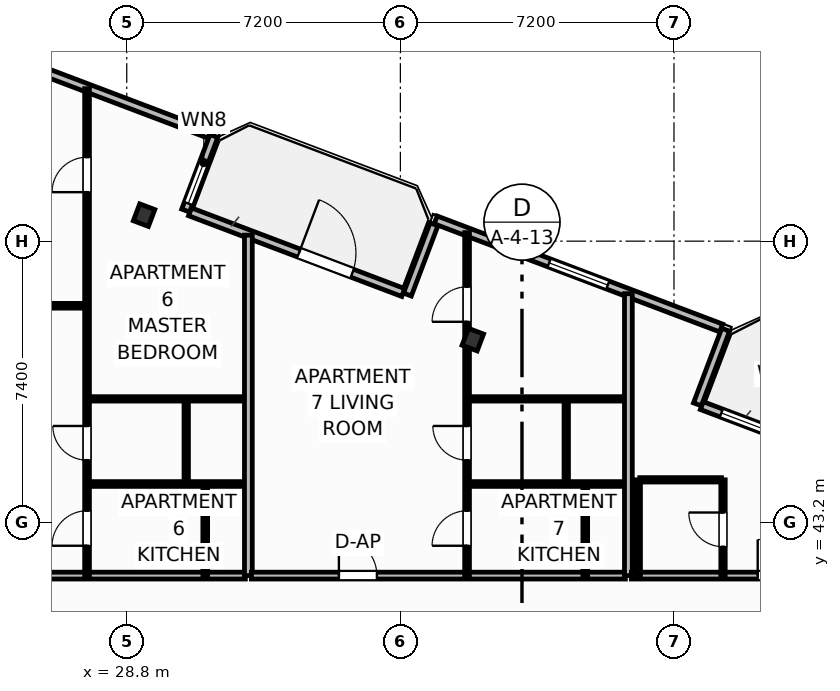
"""IFC4 building model, lengths in metres.
Left out: names, types, materials, properties, quantities, classifications, styles, units other than length and angle.
Written with IfcOpenShell. Run it as: python <this file> out.ifc"""

import sys

from ifc_helpers import new_model, si_unit, direction, frame, frame_2d, origin, origin_2d, place, context, subcontext, project, spatial, rectangle, i_section, extrude, element, fill, save


model = new_model("IFC4")
c1 = context("Model", 3, precision=1e-05, world=origin(), true_north=direction((0.0, 1.0)))
c2 = subcontext(c1, "Body", "Model", "MODEL_VIEW")
j1 = project(units=[si_unit("LENGTHUNIT", "METRE"), si_unit("PLANEANGLEUNIT", "RADIAN")], contexts=[c1])
p1 = place(None, origin())
s1 = spatial("IfcSite", under=j1, at=p1, CompositionType="ELEMENT")
p2 = place(p1, origin())
s2 = spatial("IfcBuilding", under=s1, at=p2, CompositionType="ELEMENT")
p3 = place(p2, frame((0.0, 0.0, 102.1)))
s3 = spatial("IfcBuildingStorey", under=s2, at=p3, CompositionType="ELEMENT", Elevation=102.1)
for number, where, z_axis, x_axis in (
    (1, (37.906, 48.009, 0.0), (0.0, 0.0, 1.0), (0.935, -0.354, 0.0)),
    (2, (29.256, 51.284, 0.0), (0.0, 0.0, 1.0), (0.935, -0.354, 0.0)),
):
    element("IfcColumn", number, at=place(p3, frame(where, z_axis=z_axis, x_axis=x_axis)), inside=s3, PredefinedType="COLUMN", context=c2, shape_type="SweptSolid", body=[
        extrude(i_section(OverallWidth=0.424, OverallDepth=0.474, WebThickness=0.048, FlangeThickness=0.077, FilletRadius=0.025, at=origin_2d()), origin(), (0.0, 0.0, 1.0), 3.7),
    ])
p4 = place(p3, frame((30.465, 51.372, 0.0), z_axis=(0.0, 0.0, 1.0), x_axis=(0.935227640088, -0.354046976001, 0.0)))
e3 = element("IfcWall", 3, at=p4, inside=s3, PredefinedType="SOLIDWALL", context=c2, shape_type="SweptSolid", body=[
    extrude(rectangle(XDim=6.0, YDim=0.22, at=frame_2d((3.0, 0.0))), origin(), (0.0, 0.0, 1.0), 2.73),
])
p5 = place(p4, frame((3.064, 0.0, 0.0)))
e4 = element("IfcOpeningElement", 4, at=p5, cuts=e3, PredefinedType="OPENING", context=c2, shape_type="SweptSolid", body=[
    extrude(rectangle(XDim=1.5, YDim=2.25, at=frame_2d((0.75, 1.125))), frame((0.0, 0.12, 0.0), z_axis=(0.0, -1.0, 0.0), x_axis=(1.0, 0.0, 0.0)), (0.0, 0.0, 1.0), 0.24),
])
p6 = place(p3, frame((43.932, 46.273, 0.0), z_axis=(0.0, 0.0, 1.0), x_axis=(0.93521416643, -0.354082565101, 0.0)))
e5 = element("IfcWall", 5, at=p6, inside=s3, PredefinedType="SOLIDWALL", context=c2, shape_type="SweptSolid", body=[
    extrude(rectangle(XDim=6.0, YDim=0.22, at=frame_2d((3.0, 0.0))), origin(), (0.0, 0.0, 1.0), 2.73),
])
p7 = place(p6, frame((3.508, 0.0, 0.0)))
e6 = element("IfcOpeningElement", 6, at=p7, cuts=e5, PredefinedType="OPENING", context=c2, shape_type="SweptSolid", body=[
    extrude(rectangle(XDim=1.5, YDim=2.25, at=frame_2d((0.75, 1.125))), frame((0.0, 0.12, 0.0), z_axis=(0.0, -1.0, 0.0), x_axis=(1.0, 0.0, 0.0)), (0.0, 0.0, 1.0), 0.24),
])
p8 = place(p6, frame((0.55, 0.0, 0.75)))
e7 = element("IfcOpeningElement", 7, at=p8, cuts=e5, PredefinedType="OPENING", context=c2, shape_type="SweptSolid", body=[
    extrude(rectangle(XDim=1.65, YDim=1.65, at=frame_2d((0.825, 0.825))), frame((0.0, 0.12, 0.0), z_axis=(0.0, -1.0, 0.0), x_axis=(1.0, 0.0, 0.0)), (0.0, 0.0, 1.0), 0.24),
])
p9 = place(p3, frame((43.817, 46.306, 0.0), z_axis=(0.0, 0.0, 1.0), x_axis=(0.353988291547, 0.935249854022, 0.0)))
e8 = element("IfcWall", 8, at=p9, inside=s3, PredefinedType="SOLIDWALL", context=c2, shape_type="SweptSolid", body=[
    extrude(rectangle(XDim=2.1, YDim=0.22, at=frame_2d((1.05, 0.0))), origin(), (0.0, 0.0, 1.0), 2.73),
])
p10 = place(p3, frame((44.443, 48.314, 0.0), z_axis=(0.0, 0.0, 1.0), x_axis=(-0.935226988293, 0.354048697735, 0.0)))
e9 = element("IfcWall", 9, at=p10, inside=s3, PredefinedType="SOLIDWALL", context=c2, shape_type="SweptSolid", body=[
    extrude(rectangle(XDim=8.035, YDim=0.22, at=frame_2d((4.018, 0.0))), origin(), (0.0, 0.0, 1.0), 2.73),
])
p11 = place(p10, frame((3.192, 0.0, 0.8)))
e10 = element("IfcOpeningElement", 10, at=p11, cuts=e9, PredefinedType="OPENING", context=c2, shape_type="SweptSolid", body=[
    extrude(rectangle(XDim=1.65, YDim=1.65, at=frame_2d((0.825, 0.825))), frame((0.0, 0.12, 0.0), z_axis=(0.0, -1.0, 0.0), x_axis=(1.0, 0.0, 0.0)), (0.0, 0.0, 1.0), 0.24),
])
p12 = place(p3, frame((36.885, 51.042, 0.0), z_axis=(0.0, 0.0, 1.0), x_axis=(-0.354128791944, -0.935196663123, 0.0)))
e11 = element("IfcWall", 11, at=p12, inside=s3, PredefinedType="SOLIDWALL", context=c2, shape_type="SweptSolid", body=[
    extrude(rectangle(XDim=1.975, YDim=0.22, at=frame_2d((0.988, 0.0))), origin(), (0.0, 0.0, 1.0), 2.73),
])
p13 = place(p3, frame((30.349, 51.405, 0.0), z_axis=(0.0, 0.0, 1.0), x_axis=(0.354128469405, 0.935196785258, 0.0)))
e12 = element("IfcWall", 12, at=p13, inside=s3, PredefinedType="SOLIDWALL", context=c2, shape_type="SweptSolid", body=[
    extrude(rectangle(XDim=2.1, YDim=0.22, at=frame_2d((1.05, 0.0))), origin(), (0.0, 0.0, 1.0), 2.73),
])
p14 = place(p13, frame((0.2, 0.0, 0.8)))
e13 = element("IfcOpeningElement", 13, at=p14, cuts=e12, PredefinedType="OPENING", context=c2, shape_type="SweptSolid", body=[
    extrude(rectangle(XDim=1.15, YDim=1.4, at=frame_2d((0.575, 0.7))), frame((0.0, 0.12, 0.0), z_axis=(0.0, -1.0, 0.0), x_axis=(1.0, 0.0, 0.0)), (0.0, 0.0, 1.0), 0.24),
])
p15 = place(p3, frame((30.976, 53.413, 0.0), z_axis=(0.0, 0.0, 1.0), x_axis=(-0.935220327379, 0.354066292178, 0.0)))
e14 = element("IfcWall", 14, at=p15, inside=s3, PredefinedType="SOLIDWALL", context=c2, shape_type="SweptSolid", body=[
    extrude(rectangle(XDim=14.347, YDim=0.22, at=frame_2d((7.174, 0.0))), origin(), (0.0, 0.0, 1.0), 2.73),
])
p16 = place(p15, frame((6.348, 0.0, 0.8)))
e15 = element("IfcOpeningElement", 15, at=p16, cuts=e14, PredefinedType="OPENING", context=c2, shape_type="SweptSolid", body=[
    extrude(rectangle(XDim=1.65, YDim=1.65, at=frame_2d((0.825, 0.825))), frame((0.0, 0.12, 0.0), z_axis=(0.0, -1.0, 0.0), x_axis=(1.0, 0.0, 0.0)), (0.0, 0.0, 1.0), 0.24),
])
p17 = place(p3, frame((22.08, 48.9, 0.0), z_axis=(0.0, 0.0, 1.0), x_axis=(1.0, 0.0, 0.0)))
e16 = element("IfcWall", 16, at=p17, inside=s3, PredefinedType="PARTITIONING", context=c2, shape_type="SweptSolid", body=[
    extrude(rectangle(XDim=5.605, YDim=0.125, at=frame_2d((2.803, 0.0))), origin(), (0.0, 0.0, 1.0), 3.45),
])
p18 = place(p17, frame((2.522, 0.0, 0.0)))
e17 = element("IfcOpeningElement", 17, at=p18, cuts=e16, PredefinedType="OPENING", context=c2, shape_type="SweptSolid", body=[
    extrude(rectangle(XDim=0.92, YDim=2.05, at=frame_2d((0.46, 1.025))), frame((0.0, 0.073, 0.0), z_axis=(0.0, -1.0, 0.0), x_axis=(1.0, 0.0, 0.0)), (0.0, 0.0, 1.0), 0.145),
])
p19 = place(p3, frame((22.08, 41.8, 0.0), z_axis=(0.0, 0.0, 1.0), x_axis=(1.0, 0.0, 0.0)))
e18 = element("IfcWall", 18, at=p19, inside=s3, PredefinedType="PARTITIONING", context=c2, shape_type="SweptSolid", body=[
    extrude(rectangle(XDim=9.84, YDim=0.18, at=frame_2d((4.92, 0.0))), origin(), (0.0, 0.0, 1.0), 3.45),
])
p20 = place(p19, frame((2.302, 0.0, 0.0)))
e19 = element("IfcOpeningElement", 19, at=p20, cuts=e18, PredefinedType="OPENING", context=c2, shape_type="SweptSolid", body=[
    extrude(rectangle(XDim=1.0, YDim=2.2, at=frame_2d((0.5, 1.1))), frame((0.0, 0.1, 0.0), z_axis=(0.0, -1.0, 0.0), x_axis=(1.0, 0.0, 0.0)), (0.0, 0.0, 1.0), 0.2),
])
p21 = place(p3, frame((27.755, 41.8, 0.0), z_axis=(0.0, 0.0, 1.0), x_axis=(0.0, 1.0, 0.0)))
e20 = element("IfcWall", 20, at=p21, inside=s3, PredefinedType="PARTITIONING", context=c2, shape_type="SweptSolid", body=[
    extrude(rectangle(XDim=12.811, YDim=0.125, at=frame_2d((6.405, 0.0))), origin(), (0.0, 0.0, 1.0), 3.45),
])
p22 = place(p21, frame((0.785, 0.0, 0.0)))
e21 = element("IfcOpeningElement", 21, at=p22, cuts=e20, PredefinedType="OPENING", context=c2, shape_type="SweptSolid", body=[
    extrude(rectangle(XDim=0.92, YDim=2.05, at=frame_2d((0.46, 1.025))), frame((0.0, 0.073, 0.0), z_axis=(0.0, -1.0, 0.0), x_axis=(1.0, 0.0, 0.0)), (0.0, 0.0, 1.0), 0.145),
])
p23 = place(p21, frame((3.037, 0.0, 0.0)))
e22 = element("IfcOpeningElement", 22, at=p23, cuts=e20, PredefinedType="OPENING", context=c2, shape_type="SweptSolid", body=[
    extrude(rectangle(XDim=0.9, YDim=2.05, at=frame_2d((0.45, 1.025))), frame((0.0, 0.073, 0.0), z_axis=(0.0, -1.0, 0.0), x_axis=(1.0, 0.0, 0.0)), (0.0, 0.0, 1.0), 0.145),
])
p24 = place(p21, frame((10.089, 0.0, 0.0)))
e23 = element("IfcOpeningElement", 23, at=p24, cuts=e20, PredefinedType="OPENING", context=c2, shape_type="SweptSolid", body=[
    extrude(rectangle(XDim=0.92, YDim=2.05, at=frame_2d((0.46, 1.025))), frame((0.0, 0.073, 0.0), z_axis=(0.0, -1.0, 0.0), x_axis=(1.0, 0.0, 0.0)), (0.0, 0.0, 1.0), 0.145),
])
p25 = place(p3, frame((27.825, 44.21, 0.0), z_axis=(0.0, 0.0, 1.0), x_axis=(1.0, 0.0, 0.0)))
e24 = element("IfcWall", 24, at=p25, inside=s3, PredefinedType="PARTITIONING", context=c2, shape_type="SweptSolid", body=[
    extrude(rectangle(XDim=4.095, YDim=0.125, at=frame_2d((2.047, 0.0))), origin(), (0.0, 0.0, 1.0), 3.45),
])
p26 = place(p3, frame((27.825, 46.45, 0.0), z_axis=(0.0, 0.0, 1.0), x_axis=(1.0, 0.0, 0.0)))
e25 = element("IfcWall", 25, at=p26, inside=s3, PredefinedType="PARTITIONING", context=c2, shape_type="SweptSolid", body=[
    extrude(rectangle(XDim=4.095, YDim=0.115, at=frame_2d((2.047, 0.0))), origin(), (0.0, 0.0, 1.0), 3.45),
])
p27 = place(p3, frame((30.865, 41.8, 0.0), z_axis=(0.0, 0.0, 1.0), x_axis=(0.0, 1.0, 0.0)))
e26 = element("IfcWall", 26, at=p27, inside=s3, PredefinedType="PARTITIONING", context=c2, shape_type="SweptSolid", body=[
    extrude(rectangle(XDim=2.41, YDim=0.125, at=frame_2d((1.205, 0.0))), origin(), (0.0, 0.0, 1.0), 3.45),
])
p28 = place(p3, frame((30.365, 44.21, 0.0), z_axis=(0.0, 0.0, 1.0), x_axis=(0.0, 1.0, 0.0)))
e27 = element("IfcWall", 27, at=p28, inside=s3, PredefinedType="PARTITIONING", context=c2, shape_type="SweptSolid", body=[
    extrude(rectangle(XDim=2.24, YDim=0.115, at=frame_2d((1.12, 0.0))), origin(), (0.0, 0.0, 1.0), 3.45),
])
p29 = place(p3, frame((32.0, 41.8, 0.0), z_axis=(0.0, 0.0, 1.0), x_axis=(0.0, 1.0, 0.0)))
e28 = element("IfcWall", 28, at=p29, inside=s3, PredefinedType="PARTITIONING", context=c2, shape_type="SweptSolid", body=[
    extrude(rectangle(XDim=8.958, YDim=0.205, at=frame_2d((4.479, 0.0))), origin(), (0.0, 0.0, 1.0), 3.45),
])
p30 = place(p3, frame((32.08, 41.8, 0.0), z_axis=(0.0, 0.0, 1.0), x_axis=(1.0, 0.0, 0.0)))
e29 = element("IfcWall", 29, at=p30, inside=s3, PredefinedType="PARTITIONING", context=c2, shape_type="SweptSolid", body=[
    extrude(rectangle(XDim=9.84, YDim=0.18, at=frame_2d((4.92, 0.0))), origin(), (0.0, 0.0, 1.0), 3.45),
])
p31 = place(p30, frame((2.302, 0.0, 0.0)))
e30 = element("IfcOpeningElement", 30, at=p31, cuts=e29, PredefinedType="OPENING", context=c2, shape_type="SweptSolid", body=[
    extrude(rectangle(XDim=1.0, YDim=2.2, at=frame_2d((0.5, 1.1))), frame((0.0, 0.1, 0.0), z_axis=(0.0, -1.0, 0.0), x_axis=(1.0, 0.0, 0.0)), (0.0, 0.0, 1.0), 0.2),
])
p32 = place(p3, frame((37.755, 41.8, 0.0), z_axis=(0.0, 0.0, 1.0), x_axis=(0.0, 1.0, 0.0)))
e31 = element("IfcWall", 31, at=p32, inside=s3, PredefinedType="PARTITIONING", context=c2, shape_type="SweptSolid", body=[
    extrude(rectangle(XDim=9.025, YDim=0.125, at=frame_2d((4.512, 0.0))), origin(), (0.0, 0.0, 1.0), 3.45),
])
p33 = place(p32, frame((0.785, 0.0, 0.0)))
e32 = element("IfcOpeningElement", 32, at=p33, cuts=e31, PredefinedType="OPENING", context=c2, shape_type="SweptSolid", body=[
    extrude(rectangle(XDim=0.92, YDim=2.05, at=frame_2d((0.46, 1.025))), frame((0.0, 0.073, 0.0), z_axis=(0.0, -1.0, 0.0), x_axis=(1.0, 0.0, 0.0)), (0.0, 0.0, 1.0), 0.145),
])
p34 = place(p32, frame((3.037, 0.0, 0.0)))
e33 = element("IfcOpeningElement", 33, at=p34, cuts=e31, PredefinedType="OPENING", context=c2, shape_type="SweptSolid", body=[
    extrude(rectangle(XDim=0.9, YDim=2.05, at=frame_2d((0.45, 1.025))), frame((0.0, 0.073, 0.0), z_axis=(0.0, -1.0, 0.0), x_axis=(1.0, 0.0, 0.0)), (0.0, 0.0, 1.0), 0.145),
])
p35 = place(p32, frame((6.678, 0.0, 0.0)))
e34 = element("IfcOpeningElement", 34, at=p35, cuts=e31, PredefinedType="OPENING", context=c2, shape_type="SweptSolid", body=[
    extrude(rectangle(XDim=0.92, YDim=2.05, at=frame_2d((0.46, 1.025))), frame((0.0, 0.073, 0.0), z_axis=(0.0, -1.0, 0.0), x_axis=(1.0, 0.0, 0.0)), (0.0, 0.0, 1.0), 0.145),
])
p36 = place(p3, frame((37.825, 44.21, 0.0), z_axis=(0.0, 0.0, 1.0), x_axis=(1.0, 0.0, 0.0)))
e35 = element("IfcWall", 35, at=p36, inside=s3, PredefinedType="PARTITIONING", context=c2, shape_type="SweptSolid", body=[
    extrude(rectangle(XDim=4.095, YDim=0.125, at=frame_2d((2.047, 0.0))), origin(), (0.0, 0.0, 1.0), 2.972),
])
p37 = place(p3, frame((37.825, 46.45, 0.0), z_axis=(0.0, 0.0, 1.0), x_axis=(1.0, 0.0, 0.0)))
e36 = element("IfcWall", 36, at=p37, inside=s3, PredefinedType="PARTITIONING", context=c2, shape_type="SweptSolid", body=[
    extrude(rectangle(XDim=4.095, YDim=0.115, at=frame_2d((2.047, 0.0))), origin(), (0.0, 0.0, 1.0), 3.45),
])
p38 = place(p3, frame((40.865, 41.8, 0.0), z_axis=(0.0, 0.0, 1.0), x_axis=(0.0, 1.0, 0.0)))
e37 = element("IfcWall", 37, at=p38, inside=s3, PredefinedType="PARTITIONING", context=c2, shape_type="SweptSolid", body=[
    extrude(rectangle(XDim=2.41, YDim=0.125, at=frame_2d((1.205, 0.0))), origin(), (0.0, 0.0, 1.0), 3.45),
])
p39 = place(p3, frame((40.365, 44.21, 0.0), z_axis=(0.0, 0.0, 1.0), x_axis=(0.0, 1.0, 0.0)))
e38 = element("IfcWall", 38, at=p39, inside=s3, PredefinedType="PARTITIONING", context=c2, shape_type="SweptSolid", body=[
    extrude(rectangle(XDim=2.24, YDim=0.115, at=frame_2d((1.12, 0.0))), origin(), (0.0, 0.0, 1.0), 3.45),
])
p40 = place(p3, frame((42.0, 41.8, 0.0), z_axis=(0.0, 0.0, 1.0), x_axis=(0.0, 1.0, 0.0)))
e39 = element("IfcWall", 39, at=p40, inside=s3, PredefinedType="PARTITIONING", context=c2, shape_type="SweptSolid", body=[
    extrude(rectangle(XDim=7.418, YDim=0.205, at=frame_2d((3.709, 0.0))), origin(), (0.0, 0.0, 1.0), 3.45),
])
p41 = place(p3, frame((42.08, 41.8, 0.0), z_axis=(0.0, 0.0, 1.0), x_axis=(1.0, 0.0, 0.0)))
e40 = element("IfcWall", 40, at=p41, inside=s3, PredefinedType="PARTITIONING", context=c2, shape_type="SweptSolid", body=[
    extrude(rectangle(XDim=9.84, YDim=0.18, at=frame_2d((4.92, 0.0))), origin(), (0.0, 0.0, 1.0), 3.45),
])
p42 = place(p41, frame((3.323, 0.0, 0.0)))
e41 = element("IfcOpeningElement", 41, at=p42, cuts=e40, PredefinedType="OPENING", context=c2, shape_type="SweptSolid", body=[
    extrude(rectangle(XDim=0.95, YDim=2.15, at=frame_2d((0.475, 1.075))), frame((0.0, 0.1, 0.0), z_axis=(0.0, -1.0, 0.0), x_axis=(1.0, 0.0, 0.0)), (0.0, 0.0, 1.0), 0.2),
])
p43 = place(p3, frame((42.3, 44.32, 0.0), z_axis=(0.0, 0.0, 1.0), x_axis=(1.0, 0.0, 0.0)))
e42 = element("IfcWall", 42, at=p43, inside=s3, PredefinedType="PARTITIONING", context=c2, shape_type="SweptSolid", body=[
    extrude(rectangle(XDim=2.15, YDim=0.115, at=frame_2d((1.075, 0.0))), origin(), (0.0, 0.0, 1.0), 3.45),
])
p44 = place(p3, frame((44.49, 41.8, 0.0), z_axis=(0.0, 0.0, 1.0), x_axis=(0.0, 1.0, 0.0)))
e43 = element("IfcWall", 43, at=p44, inside=s3, PredefinedType="PARTITIONING", context=c2, shape_type="SweptSolid", body=[
    extrude(rectangle(XDim=2.52, YDim=0.115, at=frame_2d((1.26, 0.0))), origin(), (0.0, 0.0, 1.0), 3.45),
])
p45 = place(p44, frame((0.76, 0.0, 0.0)))
e44 = element("IfcOpeningElement", 44, at=p45, cuts=e43, PredefinedType="OPENING", context=c2, shape_type="SweptSolid", body=[
    extrude(rectangle(XDim=0.9, YDim=2.05, at=frame_2d((0.45, 1.025))), frame((0.0, 0.067, 0.0), z_axis=(0.0, -1.0, 0.0), x_axis=(1.0, 0.0, 0.0)), (0.0, 0.0, 1.0), 0.135),
])
p46 = place(p3, frame((42.26, 41.8, 0.0), z_axis=(0.0, 0.0, 1.0), x_axis=(0.0, 1.0, 0.0)))
e45 = element("IfcWall", 45, at=p46, inside=s3, PredefinedType="PARTITIONING", context=c2, shape_type="SweptSolid", body=[
    extrude(rectangle(XDim=2.52, YDim=0.115, at=frame_2d((1.26, 0.0))), origin(), (0.0, 0.0, 1.0), 3.45),
])
p47 = place(p5, origin())
e46 = element("IfcDoor", 46, at=p47, inside=s3, OperationType="SINGLE_SWING_LEFT", PredefinedType="DOOR", context=c2, shape_type="SweptSolid", body=[
    extrude(rectangle(XDim=1.5, YDim=2.25, at=frame_2d((0.75, 1.125))), frame((0.0, 0.025, 0.0), z_axis=(0.0, -1.0, 0.0), x_axis=(1.0, 0.0, 0.0)), (0.0, 0.0, 1.0), 0.05),
])
fill(e4, e46)
p48 = place(p8, origin())
e47 = element("IfcWindow", 47, at=p48, inside=s3, PartitioningType="SINGLE_PANEL", PredefinedType="WINDOW", context=c2, shape_type="SweptSolid", body=[
    extrude(rectangle(XDim=1.65, YDim=1.65, at=frame_2d((0.825, 0.825))), frame((0.0, 0.03, 0.0), z_axis=(0.0, -1.0, 0.0), x_axis=(1.0, 0.0, 0.0)), (0.0, 0.0, 1.0), 0.06),
])
fill(e7, e47)
p49 = place(p11, origin())
e48 = element("IfcWindow", 48, at=p49, inside=s3, PartitioningType="SINGLE_PANEL", PredefinedType="WINDOW", context=c2, shape_type="SweptSolid", body=[
    extrude(rectangle(XDim=1.65, YDim=1.65, at=frame_2d((0.825, 0.825))), frame((0.0, 0.03, 0.0), z_axis=(0.0, -1.0, 0.0), x_axis=(1.0, 0.0, 0.0)), (0.0, 0.0, 1.0), 0.06),
])
fill(e10, e48)
p50 = place(p22, origin())
e49 = element("IfcDoor", 49, at=p50, inside=s3, OperationType="SINGLE_SWING_LEFT", PredefinedType="DOOR", context=c2, shape_type="SweptSolid", body=[
    extrude(rectangle(XDim=0.92, YDim=2.05, at=frame_2d((0.46, 1.025))), frame((0.0, 0.025, 0.0), z_axis=(0.0, -1.0, 0.0), x_axis=(1.0, 0.0, 0.0)), (0.0, 0.0, 1.0), 0.05),
])
fill(e21, e49)
p51 = place(p23, origin())
e50 = element("IfcDoor", 50, at=p51, inside=s3, OperationType="SINGLE_SWING_RIGHT", PredefinedType="DOOR", context=c2, shape_type="SweptSolid", body=[
    extrude(rectangle(XDim=0.9, YDim=2.05, at=frame_2d((0.45, 1.025))), frame((0.0, 0.025, 0.0), z_axis=(0.0, -1.0, 0.0), x_axis=(1.0, 0.0, 0.0)), (0.0, 0.0, 1.0), 0.05),
])
fill(e22, e50)
p52 = place(p24, origin())
e51 = element("IfcDoor", 51, at=p52, inside=s3, OperationType="SINGLE_SWING_LEFT", PredefinedType="DOOR", context=c2, shape_type="SweptSolid", body=[
    extrude(rectangle(XDim=0.92, YDim=2.05, at=frame_2d((0.46, 1.025))), frame((0.0, 0.025, 0.0), z_axis=(0.0, -1.0, 0.0), x_axis=(1.0, 0.0, 0.0)), (0.0, 0.0, 1.0), 0.05),
])
fill(e23, e51)
p53 = place(p31, origin())
e52 = element("IfcDoor", 52, at=p53, inside=s3, OperationType="SINGLE_SWING_LEFT", PredefinedType="DOOR", context=c2, shape_type="SweptSolid", body=[
    extrude(rectangle(XDim=1.0, YDim=2.2, at=frame_2d((0.5, 1.1))), frame((0.0, 0.025, 0.0), z_axis=(0.0, -1.0, 0.0), x_axis=(1.0, 0.0, 0.0)), (0.0, 0.0, 1.0), 0.05),
])
fill(e30, e52)
p54 = place(p33, origin())
e53 = element("IfcDoor", 53, at=p54, inside=s3, OperationType="SINGLE_SWING_LEFT", PredefinedType="DOOR", context=c2, shape_type="SweptSolid", body=[
    extrude(rectangle(XDim=0.92, YDim=2.05, at=frame_2d((0.46, 1.025))), frame((0.0, 0.025, 0.0), z_axis=(0.0, -1.0, 0.0), x_axis=(1.0, 0.0, 0.0)), (0.0, 0.0, 1.0), 0.05),
])
fill(e32, e53)
p55 = place(p34, origin())
e54 = element("IfcDoor", 54, at=p55, inside=s3, OperationType="SINGLE_SWING_RIGHT", PredefinedType="DOOR", context=c2, shape_type="SweptSolid", body=[
    extrude(rectangle(XDim=0.9, YDim=2.05, at=frame_2d((0.45, 1.025))), frame((0.0, 0.025, 0.0), z_axis=(0.0, -1.0, 0.0), x_axis=(1.0, 0.0, 0.0)), (0.0, 0.0, 1.0), 0.05),
])
fill(e33, e54)
p56 = place(p35, origin())
e55 = element("IfcDoor", 55, at=p56, inside=s3, OperationType="SINGLE_SWING_LEFT", PredefinedType="DOOR", context=c2, shape_type="SweptSolid", body=[
    extrude(rectangle(XDim=0.92, YDim=2.05, at=frame_2d((0.46, 1.025))), frame((0.0, 0.025, 0.0), z_axis=(0.0, -1.0, 0.0), x_axis=(1.0, 0.0, 0.0)), (0.0, 0.0, 1.0), 0.05),
])
fill(e34, e55)
p57 = place(p42, origin())
e56 = element("IfcDoor", 56, at=p57, inside=s3, OperationType="SINGLE_SWING_LEFT", PredefinedType="DOOR", context=c2, shape_type="SweptSolid", body=[
    extrude(rectangle(XDim=0.95, YDim=2.15, at=frame_2d((0.475, 1.075))), frame((0.0, 0.025, 0.0), z_axis=(0.0, -1.0, 0.0), x_axis=(1.0, 0.0, 0.0)), (0.0, 0.0, 1.0), 0.05),
])
fill(e41, e56)
p58 = place(p45, origin())
e57 = element("IfcDoor", 57, at=p58, inside=s3, OperationType="SINGLE_SWING_RIGHT", PredefinedType="DOOR", context=c2, shape_type="SweptSolid", body=[
    extrude(rectangle(XDim=0.9, YDim=2.05, at=frame_2d((0.45, 1.025))), frame((0.0, 0.025, 0.0), z_axis=(0.0, -1.0, 0.0), x_axis=(1.0, 0.0, 0.0)), (0.0, 0.0, 1.0), 0.05),
])
fill(e44, e57)
p59 = place(p14, origin())
e58 = element("IfcWindow", 58, at=p59, inside=s3, PartitioningType="SINGLE_PANEL", PredefinedType="WINDOW", context=c2, shape_type="SweptSolid", body=[
    extrude(rectangle(XDim=1.15, YDim=1.4, at=frame_2d((0.575, 0.7))), frame((0.0, 0.03, 0.0), z_axis=(0.0, -1.0, 0.0), x_axis=(1.0, 0.0, 0.0)), (0.0, 0.0, 1.0), 0.06),
])
fill(e13, e58)
save(model, sys.argv[1])
